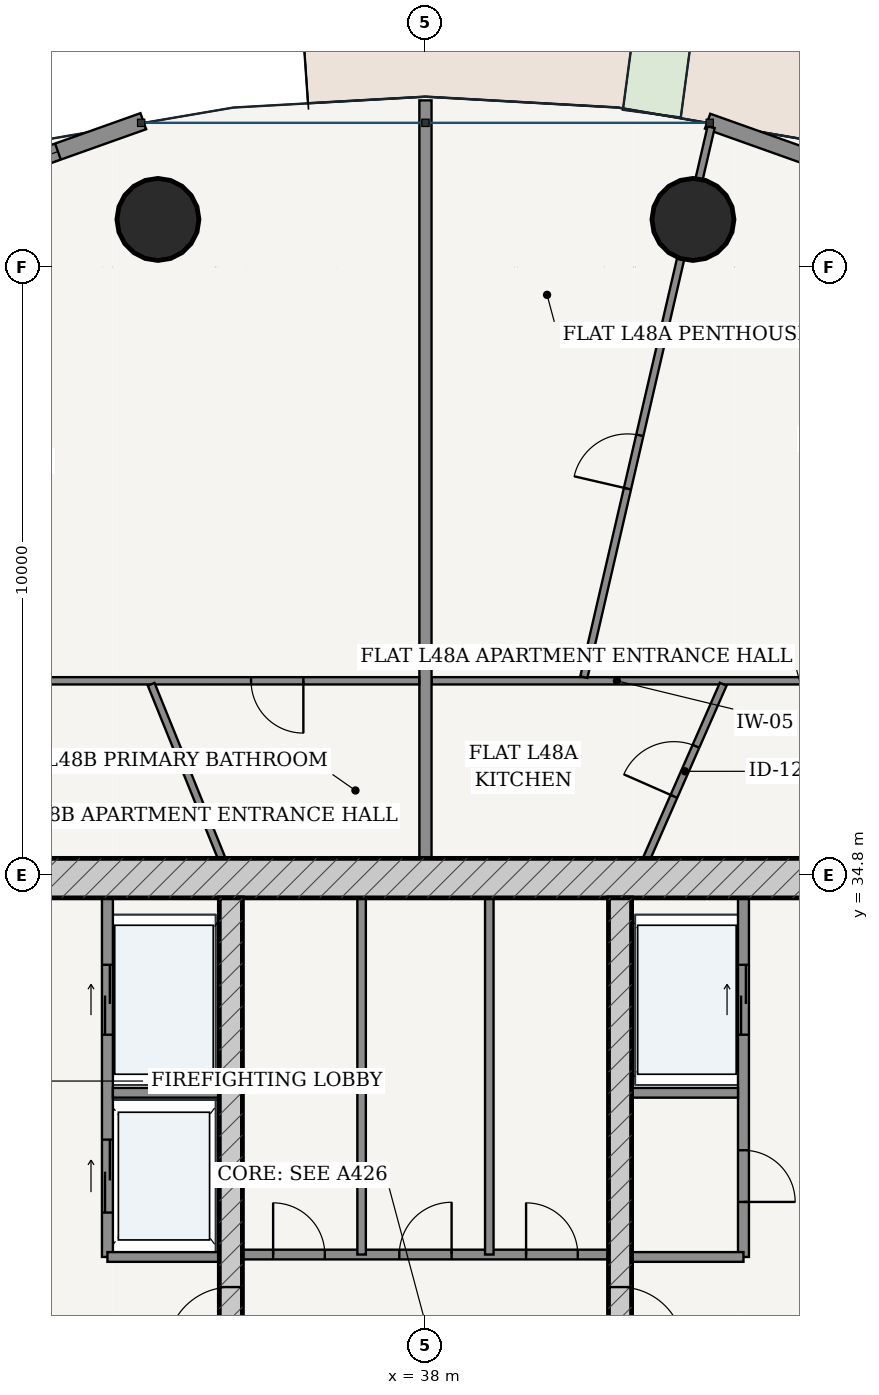
"""IFC4 building model, lengths in metres.
Left out: names, types, materials, properties, quantities, classifications, styles, units other than length and angle.
Written with IfcOpenShell. Run it as: python <this file> out.ifc"""

import sys

from ifc_helpers import new_model, si_unit, direction, frame, frame_2d, origin, origin_2d, place, context, subcontext, project, spatial, rectangle, hollow_circle, extrude, source, transform, mapped, element, fill, save


model = new_model("IFC4")
c1 = context("Model", 3, precision=1e-05, world=origin(), true_north=direction((-0.2419218956, 0.970295726276)))
c2 = subcontext(c1, "Body", "Model", "MODEL_VIEW")
j1 = project(units=[si_unit("LENGTHUNIT", "METRE"), si_unit("PLANEANGLEUNIT", "RADIAN")], contexts=[c1])
p1 = place(None, origin())
s1 = spatial("IfcSite", under=j1, at=p1, CompositionType="ELEMENT")
p2 = place(p1, origin())
s2 = spatial("IfcBuilding", under=s1, at=p2, CompositionType="ELEMENT")
p3 = place(p2, frame((0.0, 0.0, 182.2)))
s3 = spatial("IfcBuildingStorey", under=s2, at=p3, CompositionType="ELEMENT", Elevation=182.2)
p4 = place(p3, frame((28.725, 34.75, 0.0), z_axis=(0.0, 0.0, 1.0), x_axis=(1.0, 0.0, 0.0)))
e1 = element("IfcWall", 1, at=p4, inside=s3, PredefinedType="SHEAR", context=c2, shape_type="SweptSolid", body=[
    extrude(rectangle(XDim=18.55, YDim=0.65, at=frame_2d((9.275, 0.0))), origin(), (0.0, 0.0, 1.0), 3.15),
])
p5 = place(p3, frame((34.8, 19.175, 0.0), z_axis=(0.0, 0.0, 1.0), x_axis=(0.0, 1.0, 0.0)))
e2 = element("IfcWall", 2, at=p5, inside=s3, PredefinedType="SHEAR", context=c2, shape_type="SweptSolid", body=[
    extrude(rectangle(XDim=15.25, YDim=0.38, at=frame_2d((7.625, 0.0))), origin(), (0.0, 0.0, 1.0), 3.15),
])
p6 = place(p5, frame((7.8, 0.0, 0.0)))
e3 = element("IfcOpeningElement", 3, at=p6, cuts=e2, PredefinedType="OPENING", context=c2, shape_type="SweptSolid", body=[
    extrude(rectangle(XDim=1.05, YDim=2.15, at=frame_2d((0.525, 1.075))), frame((0.0, 0.2, 0.0), z_axis=(0.0, -1.0, 0.0), x_axis=(1.0, 0.0, 0.0)), (0.0, 0.0, 1.0), 0.4),
])
p7 = place(p3, frame((41.2, 19.175, 0.0), z_axis=(0.0, 0.0, 1.0), x_axis=(0.0, 1.0, 0.0)))
e4 = element("IfcWall", 4, at=p7, inside=s3, PredefinedType="SHEAR", context=c2, shape_type="SweptSolid", body=[
    extrude(rectangle(XDim=15.25, YDim=0.38, at=frame_2d((7.625, 0.0))), origin(), (0.0, 0.0, 1.0), 3.15),
])
p8 = place(p7, frame((7.8, 0.0, 0.0)))
e5 = element("IfcOpeningElement", 5, at=p8, cuts=e4, PredefinedType="OPENING", context=c2, shape_type="SweptSolid", body=[
    extrude(rectangle(XDim=1.05, YDim=2.15, at=frame_2d((0.525, 1.075))), frame((0.0, 0.2, 0.0), z_axis=(0.0, -1.0, 0.0), x_axis=(1.0, 0.0, 0.0)), (0.0, 0.0, 1.0), 0.4),
])
for number, where, z_axis, x_axis in (
    (6, (42.399, 45.582, 0.0), (0.0, 0.0, 1.0), (1.0, 0.0, 0.0)),
    (7, (33.601, 45.582, 0.0), (0.0, 0.0, 1.0), (1.0, 0.0, 0.0)),
):
    element("IfcColumn", number, at=place(p3, frame(where, z_axis=z_axis, x_axis=x_axis)), inside=s3, PredefinedType="COLUMN", context=c2, shape_type="SweptSolid", body=[
        extrude(hollow_circle(Radius=0.675, WallThickness=0.042, at=origin_2d()), origin(), (0.0, 0.0, 1.0), 3.6),
    ])
p9 = place(p3, frame((51.503, 44.043, 0.0), z_axis=(0.0, 0.0, 1.0), x_axis=(-0.942095406405, 0.335344964522, 0.0)))
e8 = element("IfcWall", 8, at=p9, inside=s3, PredefinedType="SOLIDWALL", context=c2, shape_type="SweptSolid", body=[
    extrude(rectangle(XDim=9.408, YDim=0.26, at=frame_2d((4.704, 0.0))), origin(), (0.0, 0.0, 1.0), 3.15),
])
p10 = place(p9, frame((4.029, 0.0, 0.0)))
e9 = element("IfcOpeningElement", 9, at=p10, cuts=e8, PredefinedType="OPENING", context=c2, shape_type="SweptSolid", body=[
    extrude(rectangle(XDim=1.35, YDim=2.2, at=frame_2d((0.675, 1.1))), frame((0.0, 0.14, 0.0), z_axis=(0.0, -1.0, 0.0), x_axis=(1.0, 0.0, 0.0)), (0.0, 0.0, 1.0), 0.28),
])
p11 = place(p3, frame((33.36, 47.198, 0.0), z_axis=(0.0, 0.0, 1.0), x_axis=(-0.942095406405, -0.335344964522, 0.0)))
e10 = element("IfcWall", 10, at=p11, inside=s3, PredefinedType="SOLIDWALL", context=c2, shape_type="SweptSolid", body=[
    extrude(rectangle(XDim=9.408, YDim=0.28, at=frame_2d((4.704, 0.0))), origin(), (0.0, 0.0, 1.0), 3.15),
])
p12 = place(p11, frame((1.49, 0.0, 0.85)))
e11 = element("IfcOpeningElement", 11, at=p12, cuts=e10, PredefinedType="OPENING", context=c2, shape_type="SweptSolid", body=[
    extrude(rectangle(XDim=2.1, YDim=1.95, at=frame_2d((1.05, 0.975))), frame((0.0, 0.15, 0.0), z_axis=(0.0, -1.0, 0.0), x_axis=(1.0, 0.0, 0.0)), (0.0, 0.0, 1.0), 0.3),
])
p13 = place(p11, frame((5.818, 0.0, 0.85)))
e12 = element("IfcOpeningElement", 12, at=p13, cuts=e10, PredefinedType="OPENING", context=c2, shape_type="SweptSolid", body=[
    extrude(rectangle(XDim=2.1, YDim=1.95, at=frame_2d((1.05, 0.975))), frame((0.0, 0.15, 0.0), z_axis=(0.0, -1.0, 0.0), x_axis=(1.0, 0.0, 0.0)), (0.0, 0.0, 1.0), 0.3),
])
p14 = place(p3, frame((32.77, 28.52, 0.0), z_axis=(0.0, 0.0, 1.0), x_axis=(0.0, 1.0, 0.0)))
e13 = element("IfcWall", 13, at=p14, inside=s3, PredefinedType="PARTITIONING", context=c2, shape_type="SweptSolid", body=[
    extrude(rectangle(XDim=5.905, YDim=0.18, at=frame_2d((2.953, 0.0))), origin(), (0.0, 0.0, 1.0), 3.15),
])
p15 = place(p14, frame((3.655, 0.0, 0.0)))
e14 = element("IfcOpeningElement", 14, at=p15, cuts=e13, PredefinedType="OPENING", context=c2, shape_type="SweptSolid", body=[
    extrude(rectangle(XDim=1.15, YDim=2.2, at=frame_2d((0.575, 1.1))), frame((0.0, 0.1, 0.0), z_axis=(0.0, -1.0, 0.0), x_axis=(1.0, 0.0, 0.0)), (0.0, 0.0, 1.0), 0.2),
])
p16 = place(p14, frame((0.73, 0.0, 0.0)))
e15 = element("IfcOpeningElement", 15, at=p16, cuts=e13, PredefinedType="OPENING", context=c2, shape_type="SweptSolid", body=[
    extrude(rectangle(XDim=1.2, YDim=2.25, at=frame_2d((0.6, 1.125))), frame((0.0, 0.1, 0.0), z_axis=(0.0, -1.0, 0.0), x_axis=(1.0, 0.0, 0.0)), (0.0, 0.0, 1.0), 0.2),
])
p17 = place(p3, frame((32.86, 31.22, 0.0), z_axis=(0.0, 0.0, 1.0), x_axis=(1.0, 0.0, 0.0)))
e16 = element("IfcWall", 16, at=p17, inside=s3, PredefinedType="PARTITIONING", context=c2, shape_type="SweptSolid", body=[
    extrude(rectangle(XDim=1.75, YDim=0.16, at=frame_2d((0.875, 0.0))), origin(), (0.0, 0.0, 1.0), 3.15),
])
p18 = place(p3, frame((32.77, 28.52, 0.0), z_axis=(0.0, 0.0, 1.0), x_axis=(1.0, 0.0, 0.0)))
e17 = element("IfcWall", 17, at=p18, inside=s3, PredefinedType="PARTITIONING", context=c2, shape_type="SweptSolid", body=[
    extrude(rectangle(XDim=1.84, YDim=0.16, at=frame_2d((0.92, 0.0))), origin(), (0.0, 0.0, 1.0), 3.15),
])
p19 = place(p3, frame((43.23, 28.52, 0.0), z_axis=(0.0, 0.0, 1.0), x_axis=(0.0, 1.0, 0.0)))
e18 = element("IfcWall", 18, at=p19, inside=s3, PredefinedType="PARTITIONING", context=c2, shape_type="SweptSolid", body=[
    extrude(rectangle(XDim=5.905, YDim=0.18, at=frame_2d((2.953, 0.0))), origin(), (0.0, 0.0, 1.0), 3.15),
])
p20 = place(p19, frame((0.905, 0.0, 0.0)))
e19 = element("IfcOpeningElement", 19, at=p20, cuts=e18, PredefinedType="OPENING", context=c2, shape_type="SweptSolid", body=[
    extrude(rectangle(XDim=0.85, YDim=2.1, at=frame_2d((0.425, 1.05))), frame((0.0, 0.1, 0.0), z_axis=(0.0, -1.0, 0.0), x_axis=(1.0, 0.0, 0.0)), (0.0, 0.0, 1.0), 0.2),
])
p21 = place(p19, frame((3.655, 0.0, 0.0)))
e20 = element("IfcOpeningElement", 20, at=p21, cuts=e18, PredefinedType="OPENING", context=c2, shape_type="SweptSolid", body=[
    extrude(rectangle(XDim=1.15, YDim=2.2, at=frame_2d((0.575, 1.1))), frame((0.0, 0.1, 0.0), z_axis=(0.0, -1.0, 0.0), x_axis=(1.0, 0.0, 0.0)), (0.0, 0.0, 1.0), 0.2),
])
p22 = place(p3, frame((41.39, 31.22, 0.0), z_axis=(0.0, 0.0, 1.0), x_axis=(1.0, 0.0, 0.0)))
e21 = element("IfcWall", 21, at=p22, inside=s3, PredefinedType="PARTITIONING", context=c2, shape_type="SweptSolid", body=[
    extrude(rectangle(XDim=1.75, YDim=0.16, at=frame_2d((0.875, 0.0))), origin(), (0.0, 0.0, 1.0), 3.15),
])
p23 = place(p3, frame((41.39, 28.52, 0.0), z_axis=(0.0, 0.0, 1.0), x_axis=(1.0, 0.0, 0.0)))
e22 = element("IfcWall", 22, at=p23, inside=s3, PredefinedType="PARTITIONING", context=c2, shape_type="SweptSolid", body=[
    extrude(rectangle(XDim=1.84, YDim=0.16, at=frame_2d((0.92, 0.0))), origin(), (0.0, 0.0, 1.0), 3.15),
])
p24 = place(p3, frame((34.99, 28.56, 0.0), z_axis=(0.0, 0.0, 1.0), x_axis=(1.0, 0.0, 0.0)))
e23 = element("IfcWall", 23, at=p24, inside=s3, PredefinedType="PARTITIONING", context=c2, shape_type="SweptSolid", body=[
    extrude(rectangle(XDim=6.02, YDim=0.16, at=frame_2d((3.01, 0.0))), origin(), (0.0, 0.0, 1.0), 3.15),
])
p25 = place(p24, frame((0.505, 0.0, 0.0)))
e24 = element("IfcOpeningElement", 24, at=p25, cuts=e23, PredefinedType="OPENING", context=c2, shape_type="SweptSolid", body=[
    extrude(rectangle(XDim=0.85, YDim=2.1, at=frame_2d((0.425, 1.05))), frame((0.0, 0.09, 0.0), z_axis=(0.0, -1.0, 0.0), x_axis=(1.0, 0.0, 0.0)), (0.0, 0.0, 1.0), 0.18),
])
p26 = place(p24, frame((2.58, 0.0, 0.0)))
e25 = element("IfcOpeningElement", 25, at=p26, cuts=e23, PredefinedType="OPENING", context=c2, shape_type="SweptSolid", body=[
    extrude(rectangle(XDim=0.86, YDim=2.1, at=frame_2d((0.43, 1.05))), frame((0.0, 0.09, 0.0), z_axis=(0.0, -1.0, 0.0), x_axis=(1.0, 0.0, 0.0)), (0.0, 0.0, 1.0), 0.18),
])
p27 = place(p24, frame((4.665, 0.0, 0.0)))
e26 = element("IfcOpeningElement", 26, at=p27, cuts=e23, PredefinedType="OPENING", context=c2, shape_type="SweptSolid", body=[
    extrude(rectangle(XDim=0.85, YDim=2.1, at=frame_2d((0.425, 1.05))), frame((0.0, 0.09, 0.0), z_axis=(0.0, -1.0, 0.0), x_axis=(1.0, 0.0, 0.0)), (0.0, 0.0, 1.0), 0.18),
])
for number, where, z_axis, x_axis in (
    (27, (36.95, 28.56, 0.0), (0.0, 0.0, 1.0), (0.0, 1.0, 0.0)),
    (28, (39.05, 28.56, 0.0), (0.0, 0.0, 1.0), (0.0, 1.0, 0.0)),
):
    element("IfcWall", number, at=place(p3, frame(where, z_axis=z_axis, x_axis=x_axis)), inside=s3, PredefinedType="PARTITIONING", context=c2, shape_type="SweptSolid", body=[
        extrude(rectangle(XDim=5.865, YDim=0.14, at=frame_2d((2.933, 0.0))), origin(), (0.0, 0.0, 1.0), 3.15),
    ])
p28 = place(p3, frame((38.102, 37.995, 0.0), z_axis=(0.0, 0.0, 1.0), x_axis=(1.0, 0.0, 0.0)))
e29 = element("IfcWall", 29, at=p28, inside=s3, PredefinedType="PARTITIONING", context=c2, shape_type="SweptSolid", body=[
    extrude(rectangle(XDim=6.093, YDim=0.12, at=frame_2d((3.046, 0.0))), origin(), (0.0, 0.0, 1.0), 2.666),
])
p29 = place(p3, frame((40.605, 38.055, 0.0), z_axis=(0.0, 0.0, 1.0), x_axis=(0.225466493239, 0.974250922723, 0.0)))
e30 = element("IfcWall", 30, at=p29, inside=s3, PredefinedType="PARTITIONING", context=c2, shape_type="SweptSolid", body=[
    extrude(rectangle(XDim=9.282, YDim=0.12, at=frame_2d((4.641, 0.0))), origin(), (0.0, 0.0, 1.0), 2.5),
])
p30 = place(p29, frame((3.182, 0.0, 0.0)))
e31 = element("IfcOpeningElement", 31, at=p30, cuts=e30, PredefinedType="OPENING", context=c2, shape_type="SweptSolid", body=[
    extrude(rectangle(XDim=0.9, YDim=2.15, at=frame_2d((0.45, 1.075))), frame((0.0, 0.07, 0.0), z_axis=(0.0, -1.0, 0.0), x_axis=(1.0, 0.0, 0.0)), (0.0, 0.0, 1.0), 0.14),
])
p31 = place(p3, frame((41.638, 35.075, 0.0), z_axis=(0.0, 0.0, 1.0), x_axis=(0.402456087228, 0.915439292282, 0.0)))
e32 = element("IfcWall", 32, at=p31, inside=s3, PredefinedType="PARTITIONING", context=c2, shape_type="SweptSolid", body=[
    extrude(rectangle(XDim=3.128, YDim=0.12, at=frame_2d((1.564, 0.0))), origin(), (0.0, 0.0, 1.0), 3.15),
])
p32 = place(p31, frame((1.114, 0.0, 0.0)))
e33 = element("IfcOpeningElement", 33, at=p32, cuts=e32, PredefinedType="OPENING", context=c2, shape_type="SweptSolid", body=[
    extrude(rectangle(XDim=0.9, YDim=2.15, at=frame_2d((0.45, 1.075))), frame((0.0, 0.07, 0.0), z_axis=(0.0, -1.0, 0.0), x_axis=(1.0, 0.0, 0.0)), (0.0, 0.0, 1.0), 0.14),
])
p33 = place(p3, frame((38.0, 35.075, 0.0), z_axis=(0.0, 0.0, 1.0), x_axis=(0.0, 1.0, 0.0)))
e34 = element("IfcWall", 34, at=p33, inside=s3, PredefinedType="PARTITIONING", context=c2, shape_type="SweptSolid", body=[
    extrude(rectangle(XDim=12.465, YDim=0.2, at=frame_2d((6.232, 0.0))), origin(), (0.0, 0.0, 1.0), 2.34),
])
p34 = place(p3, frame((31.805, 37.995, 0.0), z_axis=(0.0, 0.0, 1.0), x_axis=(1.0, 0.0, 0.0)))
e35 = element("IfcWall", 35, at=p34, inside=s3, PredefinedType="PARTITIONING", context=c2, shape_type="SweptSolid", body=[
    extrude(rectangle(XDim=6.093, YDim=0.12, at=frame_2d((3.046, 0.0))), origin(), (0.0, 0.0, 1.0), 2.666),
])
p35 = place(p34, frame((3.327, 0.0, 0.0)))
e36 = element("IfcOpeningElement", 36, at=p35, cuts=e35, PredefinedType="OPENING", context=c2, shape_type="SweptSolid", body=[
    extrude(rectangle(XDim=0.86, YDim=2.15, at=frame_2d((0.43, 1.075))), frame((0.0, 0.07, 0.0), z_axis=(0.0, -1.0, 0.0), x_axis=(1.0, 0.0, 0.0)), (0.0, 0.0, 1.0), 0.14),
])
p36 = place(p3, frame((34.649, 35.075, 0.0), z_axis=(0.0, 0.0, 1.0), x_axis=(-0.375339921816, 0.926887233212, 0.0)))
e37 = element("IfcWall", 37, at=p36, inside=s3, PredefinedType="PARTITIONING", context=c2, shape_type="SweptSolid", body=[
    extrude(rectangle(XDim=3.088, YDim=0.12, at=frame_2d((1.544, 0.0))), origin(), (0.0, 0.0, 1.0), 3.15),
])
m1 = source(origin(), c2, "Body", "SweptSolid", [
    extrude(rectangle(XDim=2.1, YDim=1.95, at=frame_2d((1.05, 0.975))), frame((0.0, 0.03, 0.0), z_axis=(0.0, -1.0, 0.0), x_axis=(1.0, 0.0, 0.0)), (0.0, 0.0, 1.0), 0.06),
])
p37 = place(p12, origin())
e38 = element("IfcWindow", 38, at=p37, inside=s3, PartitioningType="SINGLE_PANEL", PredefinedType="WINDOW", context=c2, shape_type="MappedRepresentation", body=[
    mapped(m1, transform((0.0, 0.0, 0.0), scale=1.0)),
])
fill(e11, e38)
m2 = source(origin(), c2, "Body", "SweptSolid", [
    extrude(rectangle(XDim=1.05, YDim=2.15, at=frame_2d((0.525, 1.075))), frame((0.0, 0.025, 0.0), z_axis=(0.0, -1.0, 0.0), x_axis=(1.0, 0.0, 0.0)), (0.0, 0.0, 1.0), 0.05),
])
p38 = place(p6, origin())
e39 = element("IfcDoor", 39, at=p38, inside=s3, OperationType="SINGLE_SWING_LEFT", PredefinedType="DOOR", context=c2, shape_type="MappedRepresentation", body=[
    mapped(m2, transform((0.0, 0.0, 0.0), scale=1.0)),
])
fill(e3, e39)
p39 = place(p8, frame((1.05, 0.0, 0.0), z_axis=(0.0, 0.0, 1.0), x_axis=(-1.0, 0.0, 0.0)))
e40 = element("IfcDoor", 40, at=p39, inside=s3, OperationType="SINGLE_SWING_RIGHT", PredefinedType="DOOR", context=c2, shape_type="MappedRepresentation", body=[
    mapped(m2, transform((0.0, 0.0, 0.0), scale=1.0)),
])
fill(e5, e40)
m3 = source(origin(), c2, "Body", "SweptSolid", [
    extrude(rectangle(XDim=0.85, YDim=2.1, at=frame_2d((0.425, 1.05))), frame((0.0, 0.025, 0.0), z_axis=(0.0, -1.0, 0.0), x_axis=(1.0, 0.0, 0.0)), (0.0, 0.0, 1.0), 0.05),
])
p40 = place(p20, frame((0.85, 0.0, 0.0), z_axis=(0.0, 0.0, 1.0), x_axis=(-1.0, 0.0, 0.0)))
e41 = element("IfcDoor", 41, at=p40, inside=s3, OperationType="SINGLE_SWING_RIGHT", PredefinedType="DOOR", context=c2, shape_type="MappedRepresentation", body=[
    mapped(m3, transform((0.0, 0.0, 0.0), scale=1.0)),
])
fill(e19, e41)
p41 = place(p25, origin())
e42 = element("IfcDoor", 42, at=p41, inside=s3, OperationType="SINGLE_SWING_LEFT", PredefinedType="DOOR", context=c2, shape_type="MappedRepresentation", body=[
    mapped(m3, transform((0.0, 0.0, 0.0), scale=1.0)),
])
fill(e24, e42)
m4 = source(origin(), c2, "Body", "SweptSolid", [
    extrude(rectangle(XDim=0.86, YDim=2.1, at=frame_2d((0.43, 1.05))), frame((0.0, 0.025, 0.0), z_axis=(0.0, -1.0, 0.0), x_axis=(1.0, 0.0, 0.0)), (0.0, 0.0, 1.0), 0.05),
])
p42 = place(p26, origin())
e43 = element("IfcDoor", 43, at=p42, inside=s3, OperationType="SINGLE_SWING_RIGHT", PredefinedType="DOOR", context=c2, shape_type="MappedRepresentation", body=[
    mapped(m4, transform((0.0, 0.0, 0.0), scale=1.0)),
])
fill(e25, e43)
p43 = place(p27, origin())
e44 = element("IfcDoor", 44, at=p43, inside=s3, OperationType="SINGLE_SWING_LEFT", PredefinedType="DOOR", context=c2, shape_type="MappedRepresentation", body=[
    mapped(m3, transform((0.0, 0.0, 0.0), scale=1.0)),
])
fill(e26, e44)
m5 = source(origin(), c2, "Body", "SweptSolid", [
    extrude(rectangle(XDim=1.15, YDim=2.2, at=frame_2d((0.575, 1.1))), frame((0.0, 0.025, 0.0), z_axis=(0.0, -1.0, 0.0), x_axis=(1.0, 0.0, 0.0)), (0.0, 0.0, 1.0), 0.05),
])
p44 = place(p15, origin())
e45 = element("IfcDoor", 45, at=p44, inside=s3, OperationType="DOUBLE_DOOR_SLIDING", PredefinedType="DOOR", context=c2, shape_type="MappedRepresentation", body=[
    mapped(m5, transform((0.0, 0.0, 0.0), scale=1.0)),
])
fill(e14, e45)
p45 = place(p21, origin())
e46 = element("IfcDoor", 46, at=p45, inside=s3, OperationType="DOUBLE_DOOR_SLIDING", PredefinedType="DOOR", context=c2, shape_type="MappedRepresentation", body=[
    mapped(m5, transform((0.0, 0.0, 0.0), scale=1.0)),
])
fill(e20, e46)
m6 = source(origin(), c2, "Body", "SweptSolid", [
    extrude(rectangle(XDim=1.2, YDim=2.25, at=frame_2d((0.6, 1.125))), frame((0.0, 0.025, 0.0), z_axis=(0.0, -1.0, 0.0), x_axis=(1.0, 0.0, 0.0)), (0.0, 0.0, 1.0), 0.05),
])
p46 = place(p16, origin())
e47 = element("IfcDoor", 47, at=p46, inside=s3, OperationType="DOUBLE_DOOR_SLIDING", PredefinedType="DOOR", context=c2, shape_type="MappedRepresentation", body=[
    mapped(m6, transform((0.0, 0.0, 0.0), scale=1.0)),
])
fill(e15, e47)
m7 = source(origin(), c2, "Body", "SweptSolid", [
    extrude(rectangle(XDim=0.9, YDim=2.15, at=frame_2d((0.45, 1.075))), frame((0.0, 0.025, 0.0), z_axis=(0.0, -1.0, 0.0), x_axis=(1.0, 0.0, 0.0)), (0.0, 0.0, 1.0), 0.05),
])
p47 = place(p32, origin())
e48 = element("IfcDoor", 48, at=p47, inside=s3, OperationType="SINGLE_SWING_LEFT", PredefinedType="DOOR", context=c2, shape_type="MappedRepresentation", body=[
    mapped(m7, transform((0.0, 0.0, 0.0), scale=1.0)),
])
fill(e33, e48)
p48 = place(p30, origin())
e49 = element("IfcDoor", 49, at=p48, inside=s3, OperationType="SINGLE_SWING_LEFT", PredefinedType="DOOR", context=c2, shape_type="MappedRepresentation", body=[
    mapped(m7, transform((0.0, 0.0, 0.0), scale=1.0)),
])
fill(e31, e49)
m8 = source(origin(), c2, "Body", "SweptSolid", [
    extrude(rectangle(XDim=0.86, YDim=2.15, at=frame_2d((0.43, 1.075))), frame((0.0, 0.025, 0.0), z_axis=(0.0, -1.0, 0.0), x_axis=(1.0, 0.0, 0.0)), (0.0, 0.0, 1.0), 0.05),
])
p49 = place(p35, frame((0.86, 0.0, 0.0), z_axis=(0.0, 0.0, 1.0), x_axis=(-1.0, 0.0, 0.0)))
e50 = element("IfcDoor", 50, at=p49, inside=s3, OperationType="SINGLE_SWING_LEFT", PredefinedType="DOOR", context=c2, shape_type="MappedRepresentation", body=[
    mapped(m8, transform((0.0, 0.0, 0.0), scale=1.0)),
])
fill(e36, e50)
save(model, sys.argv[1])
